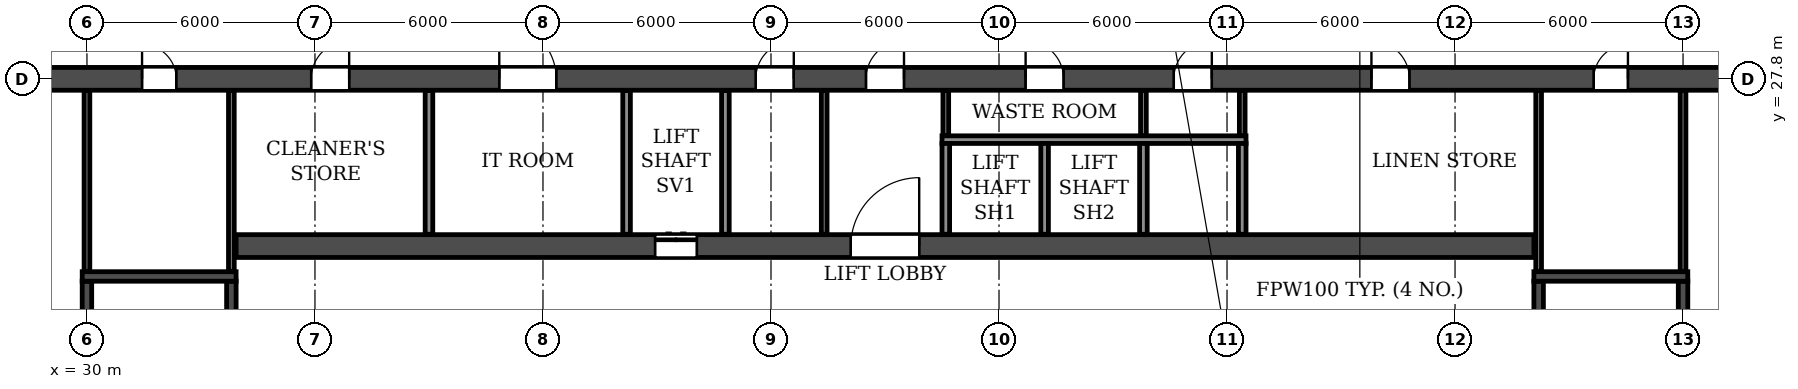
"""IFC4 building model, lengths in metres.
Left out: names, types, materials, properties, quantities, classifications, styles, units other than length and angle.
Written with IfcOpenShell. Run it as: python <this file> out.ifc"""

import sys

from ifc_helpers import new_model, si_unit, direction, frame, frame_2d, origin, place, context, subcontext, project, spatial, rectangle, extrude, element, fill, save


model = new_model("IFC4")
c1 = context("Model", 3, precision=1e-05, world=origin(), true_north=direction((0.0, 1.0)))
c2 = subcontext(c1, "Body", "Model", "MODEL_VIEW")
j1 = project(units=[si_unit("LENGTHUNIT", "METRE"), si_unit("PLANEANGLEUNIT", "RADIAN")], contexts=[c1])
p1 = place(None, origin())
s1 = spatial("IfcSite", under=j1, at=p1, CompositionType="ELEMENT")
p2 = place(p1, origin())
s2 = spatial("IfcBuilding", under=s1, at=p2, CompositionType="ELEMENT")
p3 = place(p2, frame((0.0, 0.0, 49.8)))
s3 = spatial("IfcBuildingStorey", under=s2, at=p3, CompositionType="ELEMENT", Elevation=49.8)
p4 = place(p3, frame((2.6, 27.8, 0.0), z_axis=(0.0, 0.0, 1.0), x_axis=(1.0, 0.0, 0.0)))
e1 = element("IfcWall", 1, at=p4, inside=s3, PredefinedType="SOLIDWALL", context=c2, shape_type="SweptSolid", body=[
    extrude(rectangle(XDim=96.8, YDim=0.6, at=frame_2d((48.4, 0.0))), origin(), (0.0, 0.0, 1.0), 3.0),
])
p5 = place(p4, frame((7.2, 0.0, 0.0)))
e2 = element("IfcOpeningElement", 2, at=p5, cuts=e1, PredefinedType="OPENING", context=c2, shape_type="SweptSolid", body=[
    extrude(rectangle(XDim=1.0, YDim=2.1, at=frame_2d((0.5, 1.05))), frame((0.0, 0.31, 0.0), z_axis=(0.0, -1.0, 0.0), x_axis=(1.0, 0.0, 0.0)), (0.0, 0.0, 1.0), 0.62),
])
p6 = place(p4, frame((16.3, 0.0, 0.0)))
e3 = element("IfcOpeningElement", 3, at=p6, cuts=e1, PredefinedType="OPENING", context=c2, shape_type="SweptSolid", body=[
    extrude(rectangle(XDim=1.0, YDim=2.1, at=frame_2d((0.5, 1.05))), frame((0.0, 0.31, 0.0), z_axis=(0.0, -1.0, 0.0), x_axis=(1.0, 0.0, 0.0)), (0.0, 0.0, 1.0), 0.62),
])
p7 = place(p4, frame((19.65, 0.0, 0.0)))
e4 = element("IfcOpeningElement", 4, at=p7, cuts=e1, PredefinedType="OPENING", context=c2, shape_type="SweptSolid", body=[
    extrude(rectangle(XDim=0.9, YDim=2.1, at=frame_2d((0.45, 1.05))), frame((0.0, 0.31, 0.0), z_axis=(0.0, -1.0, 0.0), x_axis=(1.0, 0.0, 0.0)), (0.0, 0.0, 1.0), 0.62),
])
p8 = place(p4, frame((28.85, 0.0, 0.0)))
e5 = element("IfcOpeningElement", 5, at=p8, cuts=e1, PredefinedType="OPENING", context=c2, shape_type="SweptSolid", body=[
    extrude(rectangle(XDim=0.9, YDim=2.1, at=frame_2d((0.45, 1.05))), frame((0.0, 0.31, 0.0), z_axis=(0.0, -1.0, 0.0), x_axis=(1.0, 0.0, 0.0)), (0.0, 0.0, 1.0), 0.62),
])
p9 = place(p4, frame((33.3, 0.0, 0.0)))
e6 = element("IfcOpeningElement", 6, at=p9, cuts=e1, PredefinedType="OPENING", context=c2, shape_type="SweptSolid", body=[
    extrude(rectangle(XDim=1.0, YDim=2.1, at=frame_2d((0.5, 1.05))), frame((0.0, 0.31, 0.0), z_axis=(0.0, -1.0, 0.0), x_axis=(1.0, 0.0, 0.0)), (0.0, 0.0, 1.0), 0.62),
])
p10 = place(p4, frame((38.25, 0.0, 0.0)))
e7 = element("IfcOpeningElement", 7, at=p10, cuts=e1, PredefinedType="OPENING", context=c2, shape_type="SweptSolid", body=[
    extrude(rectangle(XDim=1.5, YDim=2.1, at=frame_2d((0.75, 1.05))), frame((0.0, 0.31, 0.0), z_axis=(0.0, -1.0, 0.0), x_axis=(1.0, 0.0, 0.0)), (0.0, 0.0, 1.0), 0.62),
])
p11 = place(p4, frame((45.0, 0.0, 0.0)))
e8 = element("IfcOpeningElement", 8, at=p11, cuts=e1, PredefinedType="OPENING", context=c2, shape_type="SweptSolid", body=[
    extrude(rectangle(XDim=1.0, YDim=2.1, at=frame_2d((0.5, 1.05))), frame((0.0, 0.31, 0.0), z_axis=(0.0, -1.0, 0.0), x_axis=(1.0, 0.0, 0.0)), (0.0, 0.0, 1.0), 0.62),
])
p12 = place(p4, frame((47.9, 0.0, 0.0)))
e9 = element("IfcOpeningElement", 9, at=p12, cuts=e1, PredefinedType="OPENING", context=c2, shape_type="SweptSolid", body=[
    extrude(rectangle(XDim=1.0, YDim=2.1, at=frame_2d((0.5, 1.05))), frame((0.0, 0.31, 0.0), z_axis=(0.0, -1.0, 0.0), x_axis=(1.0, 0.0, 0.0)), (0.0, 0.0, 1.0), 0.62),
])
p13 = place(p4, frame((52.1, 0.0, 0.0)))
e10 = element("IfcOpeningElement", 10, at=p13, cuts=e1, PredefinedType="OPENING", context=c2, shape_type="SweptSolid", body=[
    extrude(rectangle(XDim=1.0, YDim=2.1, at=frame_2d((0.5, 1.05))), frame((0.0, 0.31, 0.0), z_axis=(0.0, -1.0, 0.0), x_axis=(1.0, 0.0, 0.0)), (0.0, 0.0, 1.0), 0.62),
])
p14 = place(p4, frame((56.0, 0.0, 0.0)))
e11 = element("IfcOpeningElement", 11, at=p14, cuts=e1, PredefinedType="OPENING", context=c2, shape_type="SweptSolid", body=[
    extrude(rectangle(XDim=1.0, YDim=2.1, at=frame_2d((0.5, 1.05))), frame((0.0, 0.31, 0.0), z_axis=(0.0, -1.0, 0.0), x_axis=(1.0, 0.0, 0.0)), (0.0, 0.0, 1.0), 0.62),
])
p15 = place(p4, frame((61.2, 0.0, 0.0)))
e12 = element("IfcOpeningElement", 12, at=p15, cuts=e1, PredefinedType="OPENING", context=c2, shape_type="SweptSolid", body=[
    extrude(rectangle(XDim=1.0, YDim=2.1, at=frame_2d((0.5, 1.05))), frame((0.0, 0.31, 0.0), z_axis=(0.0, -1.0, 0.0), x_axis=(1.0, 0.0, 0.0)), (0.0, 0.0, 1.0), 0.62),
])
p16 = place(p4, frame((67.05, 0.0, 0.0)))
e13 = element("IfcOpeningElement", 13, at=p16, cuts=e1, PredefinedType="OPENING", context=c2, shape_type="SweptSolid", body=[
    extrude(rectangle(XDim=0.9, YDim=2.1, at=frame_2d((0.45, 1.05))), frame((0.0, 0.31, 0.0), z_axis=(0.0, -1.0, 0.0), x_axis=(1.0, 0.0, 0.0)), (0.0, 0.0, 1.0), 0.62),
])
p17 = place(p4, frame((76.25, 0.0, 0.0)))
e14 = element("IfcOpeningElement", 14, at=p17, cuts=e1, PredefinedType="OPENING", context=c2, shape_type="SweptSolid", body=[
    extrude(rectangle(XDim=0.9, YDim=2.1, at=frame_2d((0.45, 1.05))), frame((0.0, 0.31, 0.0), z_axis=(0.0, -1.0, 0.0), x_axis=(1.0, 0.0, 0.0)), (0.0, 0.0, 1.0), 0.62),
])
p18 = place(p4, frame((79.5, 0.0, 0.0)))
e15 = element("IfcOpeningElement", 15, at=p18, cuts=e1, PredefinedType="OPENING", context=c2, shape_type="SweptSolid", body=[
    extrude(rectangle(XDim=1.0, YDim=2.1, at=frame_2d((0.5, 1.05))), frame((0.0, 0.31, 0.0), z_axis=(0.0, -1.0, 0.0), x_axis=(1.0, 0.0, 0.0)), (0.0, 0.0, 1.0), 0.62),
])
p19 = place(p4, frame((84.05, 0.0, 0.0)))
e16 = element("IfcOpeningElement", 16, at=p19, cuts=e1, PredefinedType="OPENING", context=c2, shape_type="SweptSolid", body=[
    extrude(rectangle(XDim=1.0, YDim=2.1, at=frame_2d((0.5, 1.05))), frame((0.0, 0.31, 0.0), z_axis=(0.0, -1.0, 0.0), x_axis=(1.0, 0.0, 0.0)), (0.0, 0.0, 1.0), 0.62),
])
p20 = place(p4, frame((91.75, 0.0, 0.0)))
e17 = element("IfcOpeningElement", 17, at=p20, cuts=e1, PredefinedType="OPENING", context=c2, shape_type="SweptSolid", body=[
    extrude(rectangle(XDim=1.0, YDim=2.1, at=frame_2d((0.5, 1.05))), frame((0.0, 0.31, 0.0), z_axis=(0.0, -1.0, 0.0), x_axis=(1.0, 0.0, 0.0)), (0.0, 0.0, 1.0), 0.62),
])
p21 = place(p3, frame((33.925, 23.4, 0.0), z_axis=(0.0, 0.0, 1.0), x_axis=(1.0, 0.0, 0.0)))
e18 = element("IfcWall", 18, at=p21, inside=s3, PredefinedType="SOLIDWALL", context=c2, shape_type="SweptSolid", body=[
    extrude(rectangle(XDim=34.15, YDim=0.6, at=frame_2d((17.075, 0.0))), origin(), (0.0, 0.0, 1.0), 3.0),
])
p22 = place(p21, frame((16.175, 0.0, 0.0)))
e19 = element("IfcOpeningElement", 19, at=p22, cuts=e18, PredefinedType="OPENING", context=c2, shape_type="SweptSolid", body=[
    extrude(rectangle(XDim=1.8, YDim=2.1, at=frame_2d((0.9, 1.05))), frame((0.0, 0.31, 0.0), z_axis=(0.0, -1.0, 0.0), x_axis=(1.0, 0.0, 0.0)), (0.0, 0.0, 1.0), 0.62),
])
p23 = place(p21, frame((11.025, 0.0, 0.0)))
e20 = element("IfcOpeningElement", 20, at=p23, cuts=e18, PredefinedType="OPENING", context=c2, shape_type="SweptSolid", body=[
    extrude(rectangle(XDim=1.1, YDim=2.1, at=frame_2d((0.55, 1.05))), frame((0.0, 0.31, 0.0), z_axis=(0.0, -1.0, 0.0), x_axis=(1.0, 0.0, 0.0)), (0.0, 0.0, 1.0), 0.62),
])
p24 = place(p3, frame((30.0, 14.9, 0.0), z_axis=(0.0, 0.0, 1.0), x_axis=(0.0, 1.0, 0.0)))
e21 = element("IfcWall", 21, at=p24, inside=s3, PredefinedType="SOLIDWALL", context=c2, shape_type="SweptSolid", body=[
    extrude(rectangle(XDim=7.575, YDim=0.25, at=frame_2d((3.788, 0.0))), origin(), (0.0, 0.0, 1.0), 3.0),
])
p25 = place(p3, frame((33.8, 14.9, 0.0), z_axis=(0.0, 0.0, 1.0), x_axis=(0.0, 1.0, 0.0)))
e22 = element("IfcWall", 22, at=p25, inside=s3, PredefinedType="SOLIDWALL", context=c2, shape_type="SweptSolid", body=[
    extrude(rectangle(XDim=7.575, YDim=0.25, at=frame_2d((3.788, 0.0))), origin(), (0.0, 0.0, 1.0), 3.0),
])
p26 = place(p25, frame((0.4, 0.0, 0.0)))
e23 = element("IfcOpeningElement", 23, at=p26, cuts=e22, PredefinedType="OPENING", context=c2, shape_type="SweptSolid", body=[
    extrude(rectangle(XDim=1.0, YDim=2.1, at=frame_2d((0.5, 1.05))), frame((0.0, 0.135, 0.0), z_axis=(0.0, -1.0, 0.0), x_axis=(1.0, 0.0, 0.0)), (0.0, 0.0, 1.0), 0.27),
])
p27 = place(p3, frame((29.875, 22.6, 0.0), z_axis=(0.0, 0.0, 1.0), x_axis=(1.0, 0.0, 0.0)))
e24 = element("IfcWall", 24, at=p27, inside=s3, PredefinedType="SOLIDWALL", context=c2, shape_type="SweptSolid", body=[
    extrude(rectangle(XDim=4.05, YDim=0.25, at=frame_2d((2.025, 0.0))), origin(), (0.0, 0.0, 1.0), 3.0),
])
p28 = place(p3, frame((68.2, 14.9, 0.0), z_axis=(0.0, 0.0, 1.0), x_axis=(0.0, 1.0, 0.0)))
e25 = element("IfcWall", 25, at=p28, inside=s3, PredefinedType="SOLIDWALL", context=c2, shape_type="SweptSolid", body=[
    extrude(rectangle(XDim=7.575, YDim=0.25, at=frame_2d((3.788, 0.0))), origin(), (0.0, 0.0, 1.0), 3.0),
])
p29 = place(p28, frame((0.4, 0.0, 0.0)))
e26 = element("IfcOpeningElement", 26, at=p29, cuts=e25, PredefinedType="OPENING", context=c2, shape_type="SweptSolid", body=[
    extrude(rectangle(XDim=1.0, YDim=2.1, at=frame_2d((0.5, 1.05))), frame((0.0, 0.135, 0.0), z_axis=(0.0, -1.0, 0.0), x_axis=(1.0, 0.0, 0.0)), (0.0, 0.0, 1.0), 0.27),
])
p30 = place(p3, frame((72.0, 14.9, 0.0), z_axis=(0.0, 0.0, 1.0), x_axis=(0.0, 1.0, 0.0)))
e27 = element("IfcWall", 27, at=p30, inside=s3, PredefinedType="SOLIDWALL", context=c2, shape_type="SweptSolid", body=[
    extrude(rectangle(XDim=7.575, YDim=0.25, at=frame_2d((3.788, 0.0))), origin(), (0.0, 0.0, 1.0), 3.0),
])
p31 = place(p3, frame((68.075, 22.6, 0.0), z_axis=(0.0, 0.0, 1.0), x_axis=(1.0, 0.0, 0.0)))
e28 = element("IfcWall", 28, at=p31, inside=s3, PredefinedType="SOLIDWALL", context=c2, shape_type="SweptSolid", body=[
    extrude(rectangle(XDim=4.05, YDim=0.25, at=frame_2d((2.025, 0.0))), origin(), (0.0, 0.0, 1.0), 3.0),
])
p32 = place(p3, frame((49.4, 23.71, 0.0), z_axis=(0.0, 0.0, 1.0), x_axis=(0.0, 1.0, 0.0)))
e29 = element("IfcWall", 29, at=p32, inside=s3, PredefinedType="PARTITIONING", context=c2, shape_type="SweptSolid", body=[
    extrude(rectangle(XDim=3.78, YDim=0.15, at=frame_2d((1.89, 0.0))), origin(), (0.0, 0.0, 1.0), 3.0),
])
for number, where, z_axis, x_axis in (
    (30, (52.6, 26.3, 0.0), (0.0, 0.0, 1.0), (0.0, 1.0, 0.0)),
    (31, (57.8, 26.3, 0.0), (0.0, 0.0, 1.0), (0.0, 1.0, 0.0)),
    (32, (60.4, 26.3, 0.0), (0.0, 0.0, 1.0), (0.0, 1.0, 0.0)),
):
    element("IfcWall", number, at=place(p3, frame(where, z_axis=z_axis, x_axis=x_axis)), inside=s3, PredefinedType="PARTITIONING", context=c2, shape_type="SweptSolid", body=[
        extrude(rectangle(XDim=1.19, YDim=0.15, at=frame_2d((0.595, 0.0))), origin(), (0.0, 0.0, 1.0), 3.0),
    ])
p33 = place(p3, frame((39.0, 23.71, 0.0), z_axis=(0.0, 0.0, 1.0), x_axis=(0.0, 1.0, 0.0)))
e33 = element("IfcWall", 33, at=p33, inside=s3, PredefinedType="PARTITIONING", context=c2, shape_type="SweptSolid", body=[
    extrude(rectangle(XDim=3.78, YDim=0.2, at=frame_2d((1.89, 0.0))), origin(), (0.0, 0.0, 1.0), 3.0),
])
for number, where, z_axis, x_axis in (
    (34, (30.0, 22.735, 0.0), (0.0, 0.0, 1.0), (0.0, 1.0, 0.0)),
    (35, (33.8, 22.735, 0.0), (0.0, 0.0, 1.0), (0.0, 1.0, 0.0)),
    (36, (68.2, 22.735, 0.0), (0.0, 0.0, 1.0), (0.0, 1.0, 0.0)),
    (37, (72.0, 22.735, 0.0), (0.0, 0.0, 1.0), (0.0, 1.0, 0.0)),
):
    element("IfcWall", number, at=place(p3, frame(where, z_axis=z_axis, x_axis=x_axis)), inside=s3, PredefinedType="PARTITIONING", context=c2, shape_type="SweptSolid", body=[
        extrude(rectangle(XDim=4.755, YDim=0.15, at=frame_2d((2.377, 0.0))), origin(), (0.0, 0.0, 1.0), 3.0),
    ])
p34 = place(p3, frame((52.5, 26.2, 0.0), z_axis=(0.0, 0.0, 1.0), x_axis=(1.0, 0.0, 0.0)))
e38 = element("IfcWall", 38, at=p34, inside=s3, PredefinedType="PARTITIONING", context=c2, shape_type="SweptSolid", body=[
    extrude(rectangle(XDim=8.0, YDim=0.2, at=frame_2d((4.0, 0.0))), origin(), (0.0, 0.0, 1.0), 3.0),
])
for number, where, z_axis, x_axis in (
    (39, (44.2, 23.71, 0.0), (0.0, 0.0, 1.0), (0.0, 1.0, 0.0)),
    (40, (46.8, 23.71, 0.0), (0.0, 0.0, 1.0), (0.0, 1.0, 0.0)),
):
    element("IfcWall", number, at=place(p3, frame(where, z_axis=z_axis, x_axis=x_axis)), inside=s3, PredefinedType="PARTITIONING", context=c2, shape_type="SweptSolid", body=[
        extrude(rectangle(XDim=3.78, YDim=0.2, at=frame_2d((1.89, 0.0))), origin(), (0.0, 0.0, 1.0), 3.0),
    ])
for number, where, z_axis, x_axis in (
    (41, (52.6, 23.71, 0.0), (0.0, 0.0, 1.0), (0.0, 1.0, 0.0)),
    (42, (55.2, 23.71, 0.0), (0.0, 0.0, 1.0), (0.0, 1.0, 0.0)),
    (43, (57.8, 23.71, 0.0), (0.0, 0.0, 1.0), (0.0, 1.0, 0.0)),
    (44, (60.4, 23.71, 0.0), (0.0, 0.0, 1.0), (0.0, 1.0, 0.0)),
):
    element("IfcWall", number, at=place(p3, frame(where, z_axis=z_axis, x_axis=x_axis)), inside=s3, PredefinedType="PARTITIONING", context=c2, shape_type="SweptSolid", body=[
        extrude(rectangle(XDim=2.39, YDim=0.2, at=frame_2d((1.195, 0.0))), origin(), (0.0, 0.0, 1.0), 3.0),
    ])
p35 = place(p8, origin())
e45 = element("IfcDoor", 45, at=p35, inside=s3, OperationType="SINGLE_SWING_LEFT", PredefinedType="DOOR", context=c2, shape_type="SweptSolid", body=[
    extrude(rectangle(XDim=0.9, YDim=2.1, at=frame_2d((0.45, 1.05))), frame((0.0, 0.025, 0.0), z_axis=(0.0, -1.0, 0.0), x_axis=(1.0, 0.0, 0.0)), (0.0, 0.0, 1.0), 0.05),
])
fill(e5, e45)
p36 = place(p9, origin())
e46 = element("IfcDoor", 46, at=p36, inside=s3, OperationType="SINGLE_SWING_RIGHT", PredefinedType="DOOR", context=c2, shape_type="SweptSolid", body=[
    extrude(rectangle(XDim=1.0, YDim=2.1, at=frame_2d((0.5, 1.05))), frame((0.0, 0.025, 0.0), z_axis=(0.0, -1.0, 0.0), x_axis=(1.0, 0.0, 0.0)), (0.0, 0.0, 1.0), 0.05),
])
fill(e6, e46)
p37 = place(p10, origin())
e47 = element("IfcDoor", 47, at=p37, inside=s3, OperationType="DOUBLE_DOOR_SINGLE_SWING", PredefinedType="DOOR", context=c2, shape_type="SweptSolid", body=[
    extrude(rectangle(XDim=1.5, YDim=2.1, at=frame_2d((0.75, 1.05))), frame((0.0, 0.025, 0.0), z_axis=(0.0, -1.0, 0.0), x_axis=(1.0, 0.0, 0.0)), (0.0, 0.0, 1.0), 0.05),
])
fill(e7, e47)
p38 = place(p11, origin())
e48 = element("IfcDoor", 48, at=p38, inside=s3, OperationType="SINGLE_SWING_RIGHT", PredefinedType="DOOR", context=c2, shape_type="SweptSolid", body=[
    extrude(rectangle(XDim=1.0, YDim=2.1, at=frame_2d((0.5, 1.05))), frame((0.0, 0.025, 0.0), z_axis=(0.0, -1.0, 0.0), x_axis=(1.0, 0.0, 0.0)), (0.0, 0.0, 1.0), 0.05),
])
fill(e8, e48)
p39 = place(p12, origin())
e49 = element("IfcDoor", 49, at=p39, inside=s3, OperationType="SINGLE_SWING_RIGHT", PredefinedType="DOOR", context=c2, shape_type="SweptSolid", body=[
    extrude(rectangle(XDim=1.0, YDim=2.1, at=frame_2d((0.5, 1.05))), frame((0.0, 0.025, 0.0), z_axis=(0.0, -1.0, 0.0), x_axis=(1.0, 0.0, 0.0)), (0.0, 0.0, 1.0), 0.05),
])
fill(e9, e49)
p40 = place(p13, origin())
e50 = element("IfcDoor", 50, at=p40, inside=s3, OperationType="SINGLE_SWING_LEFT", PredefinedType="DOOR", context=c2, shape_type="SweptSolid", body=[
    extrude(rectangle(XDim=1.0, YDim=2.1, at=frame_2d((0.5, 1.05))), frame((0.0, 0.025, 0.0), z_axis=(0.0, -1.0, 0.0), x_axis=(1.0, 0.0, 0.0)), (0.0, 0.0, 1.0), 0.05),
])
fill(e10, e50)
p41 = place(p14, origin())
e51 = element("IfcDoor", 51, at=p41, inside=s3, OperationType="SINGLE_SWING_RIGHT", PredefinedType="DOOR", context=c2, shape_type="SweptSolid", body=[
    extrude(rectangle(XDim=1.0, YDim=2.1, at=frame_2d((0.5, 1.05))), frame((0.0, 0.025, 0.0), z_axis=(0.0, -1.0, 0.0), x_axis=(1.0, 0.0, 0.0)), (0.0, 0.0, 1.0), 0.05),
])
fill(e11, e51)
p42 = place(p15, origin())
e52 = element("IfcDoor", 52, at=p42, inside=s3, OperationType="SINGLE_SWING_LEFT", PredefinedType="DOOR", context=c2, shape_type="SweptSolid", body=[
    extrude(rectangle(XDim=1.0, YDim=2.1, at=frame_2d((0.5, 1.05))), frame((0.0, 0.025, 0.0), z_axis=(0.0, -1.0, 0.0), x_axis=(1.0, 0.0, 0.0)), (0.0, 0.0, 1.0), 0.05),
])
fill(e12, e52)
p43 = place(p16, origin())
e53 = element("IfcDoor", 53, at=p43, inside=s3, OperationType="SINGLE_SWING_RIGHT", PredefinedType="DOOR", context=c2, shape_type="SweptSolid", body=[
    extrude(rectangle(XDim=0.9, YDim=2.1, at=frame_2d((0.45, 1.05))), frame((0.0, 0.025, 0.0), z_axis=(0.0, -1.0, 0.0), x_axis=(1.0, 0.0, 0.0)), (0.0, 0.0, 1.0), 0.05),
])
fill(e13, e53)
p44 = place(p22, origin())
e54 = element("IfcDoor", 54, at=p44, inside=s3, OperationType="DOUBLE_DOOR_SINGLE_SWING", PredefinedType="DOOR", context=c2, shape_type="SweptSolid", body=[
    extrude(rectangle(XDim=1.8, YDim=2.1, at=frame_2d((0.9, 1.05))), frame((0.0, 0.025, 0.0), z_axis=(0.0, -1.0, 0.0), x_axis=(1.0, 0.0, 0.0)), (0.0, 0.0, 1.0), 0.05),
])
fill(e19, e54)
p45 = place(p23, origin())
e55 = element("IfcDoor", 55, at=p45, inside=s3, OperationType="DOUBLE_DOOR_SLIDING", PredefinedType="DOOR", context=c2, shape_type="SweptSolid", body=[
    extrude(rectangle(XDim=1.1, YDim=2.1, at=frame_2d((0.55, 1.05))), frame((0.0, 0.025, 0.0), z_axis=(0.0, -1.0, 0.0), x_axis=(1.0, 0.0, 0.0)), (0.0, 0.0, 1.0), 0.05),
])
fill(e20, e55)
save(model, sys.argv[1])
